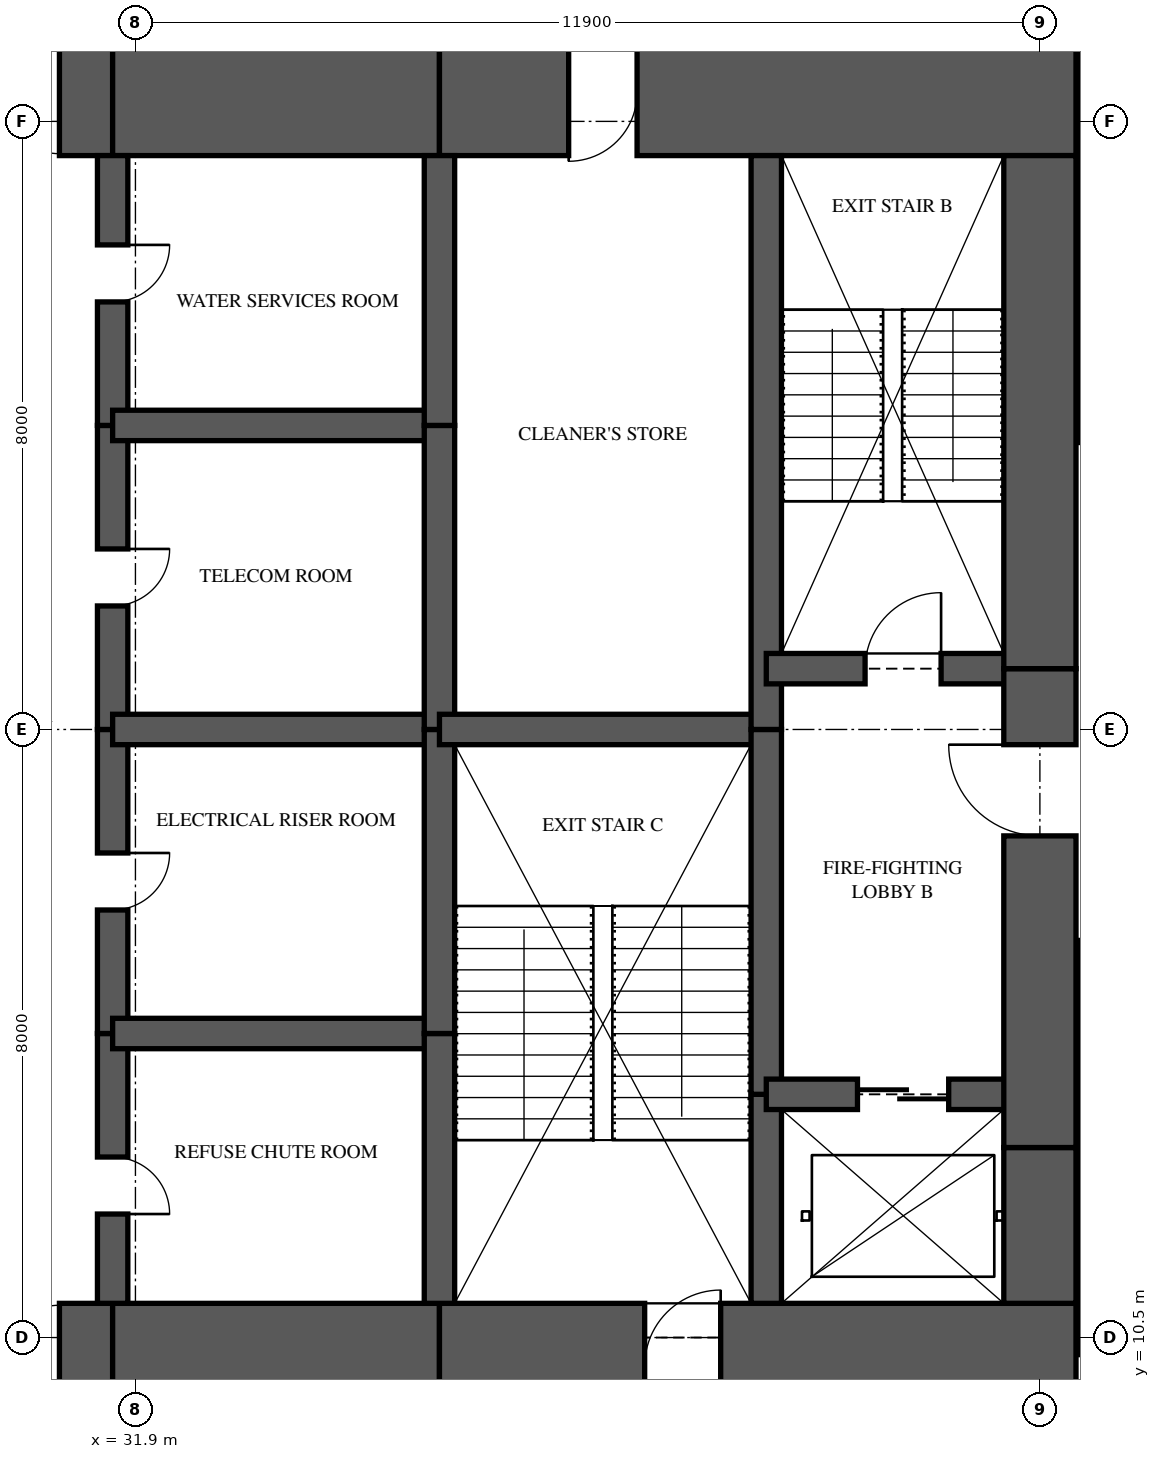
"""IFC4 building model, lengths in metres.
Left out: names, types, materials, properties, quantities, classifications, styles, units other than length and angle.
Written with IfcOpenShell. Run it as: python <this file> out.ifc"""

import sys

from ifc_helpers import new_model, si_unit, direction, frame, frame_2d, origin, place, context, subcontext, project, spatial, rectangle, extrude, element, fill, save


model = new_model("IFC4")
c1 = context("Model", 3, precision=1e-05, world=origin(), true_north=direction((0.0, 1.0)))
c2 = subcontext(c1, "Body", "Model", "MODEL_VIEW")
j1 = project(units=[si_unit("LENGTHUNIT", "METRE"), si_unit("PLANEANGLEUNIT", "RADIAN")], contexts=[c1])
p1 = place(None, origin())
s1 = spatial("IfcSite", under=j1, at=p1, CompositionType="ELEMENT")
p2 = place(p1, origin())
s2 = spatial("IfcBuilding", under=s1, at=p2, CompositionType="ELEMENT")
p3 = place(p2, frame((0.0, 0.0, 44.45)))
s3 = spatial("IfcBuildingStorey", under=s2, at=p3, CompositionType="ELEMENT", Elevation=44.45)
p4 = place(p3, frame((26.0, 10.125, 0.0), z_axis=(0.0, 0.0, 1.0), x_axis=(1.0, 0.0, 0.0)))
e1 = element("IfcWall", 1, at=p4, inside=s3, PredefinedType="SHEAR", context=c2, shape_type="SweptSolid", body=[
    extrude(rectangle(XDim=5.6, YDim=1.65, at=frame_2d((2.8, 0.0))), origin(), (0.0, 0.0, 1.0), 3.35),
])
p5 = place(p4, frame((3.3, 0.0, 0.0)))
e2 = element("IfcOpeningElement", 2, at=p5, cuts=e1, PredefinedType="OPENING", context=c2, shape_type="SweptSolid", body=[
    extrude(rectangle(XDim=1.6, YDim=2.1, at=frame_2d((0.8, 1.05))), frame((0.0, 0.835, 0.0), z_axis=(0.0, -1.0, 0.0), x_axis=(1.0, 0.0, 0.0)), (0.0, 0.0, 1.0), 1.67),
])
p6 = place(p3, frame((31.6, 10.125, 0.0), z_axis=(0.0, 0.0, 1.0), x_axis=(1.0, 0.0, 0.0)))
e3 = element("IfcWall", 3, at=p6, inside=s3, PredefinedType="SHEAR", context=c2, shape_type="SweptSolid", body=[
    extrude(rectangle(XDim=4.3, YDim=1.65, at=frame_2d((2.15, 0.0))), origin(), (0.0, 0.0, 1.0), 3.35),
])
p7 = place(p3, frame((35.9, 10.125, 0.0), z_axis=(0.0, 0.0, 1.0), x_axis=(1.0, 0.0, 0.0)))
e4 = element("IfcWall", 4, at=p7, inside=s3, PredefinedType="SHEAR", context=c2, shape_type="SweptSolid", body=[
    extrude(rectangle(XDim=8.375, YDim=1.65, at=frame_2d((4.188, 0.0))), origin(), (0.0, 0.0, 1.0), 3.35),
])
p8 = place(p7, frame((2.7, 0.0, 0.0)))
e5 = element("IfcOpeningElement", 5, at=p8, cuts=e4, PredefinedType="OPENING", context=c2, shape_type="SweptSolid", body=[
    extrude(rectangle(XDim=1.0, YDim=2.1, at=frame_2d((0.5, 1.05))), frame((0.0, 0.835, 0.0), z_axis=(0.0, -1.0, 0.0), x_axis=(1.0, 0.0, 0.0)), (0.0, 0.0, 1.0), 1.67),
])
p9 = place(p3, frame((44.275, 26.875, 0.0), z_axis=(0.0, 0.0, 1.0), x_axis=(-1.0, 0.0, 0.0)))
e6 = element("IfcWall", 6, at=p9, inside=s3, PredefinedType="SHEAR", context=c2, shape_type="SweptSolid", body=[
    extrude(rectangle(XDim=8.375, YDim=1.65, at=frame_2d((4.188, 0.0))), origin(), (0.0, 0.0, 1.0), 3.35),
])
p10 = place(p9, frame((5.775, 0.0, 0.0)))
e7 = element("IfcOpeningElement", 7, at=p10, cuts=e6, PredefinedType="OPENING", context=c2, shape_type="SweptSolid", body=[
    extrude(rectangle(XDim=0.9, YDim=2.1, at=frame_2d((0.45, 1.05))), frame((0.0, 0.835, 0.0), z_axis=(0.0, -1.0, 0.0), x_axis=(1.0, 0.0, 0.0)), (0.0, 0.0, 1.0), 1.67),
])
p11 = place(p3, frame((35.9, 26.875, 0.0), z_axis=(0.0, 0.0, 1.0), x_axis=(-1.0, 0.0, 0.0)))
e8 = element("IfcWall", 8, at=p11, inside=s3, PredefinedType="SHEAR", context=c2, shape_type="SweptSolid", body=[
    extrude(rectangle(XDim=4.3, YDim=1.65, at=frame_2d((2.15, 0.0))), origin(), (0.0, 0.0, 1.0), 3.35),
])
p12 = place(p3, frame((31.6, 26.875, 0.0), z_axis=(0.0, 0.0, 1.0), x_axis=(-1.0, 0.0, 0.0)))
e9 = element("IfcWall", 9, at=p12, inside=s3, PredefinedType="SHEAR", context=c2, shape_type="SweptSolid", body=[
    extrude(rectangle(XDim=5.6, YDim=1.65, at=frame_2d((2.8, 0.0))), origin(), (0.0, 0.0, 1.0), 3.35),
])
p13 = place(p12, frame((0.7, 0.0, 0.0)))
e10 = element("IfcOpeningElement", 10, at=p13, cuts=e9, PredefinedType="OPENING", context=c2, shape_type="SweptSolid", body=[
    extrude(rectangle(XDim=1.6, YDim=2.1, at=frame_2d((0.8, 1.05))), frame((0.0, 0.835, 0.0), z_axis=(0.0, -1.0, 0.0), x_axis=(1.0, 0.0, 0.0)), (0.0, 0.0, 1.0), 1.67),
])
p14 = place(p3, frame((43.8, 10.95, 0.0), z_axis=(0.0, 0.0, 1.0), x_axis=(0.0, 1.0, 0.0)))
e11 = element("IfcWall", 11, at=p14, inside=s3, PredefinedType="SHEAR", context=c2, shape_type="SweptSolid", body=[
    extrude(rectangle(XDim=2.05, YDim=0.95, at=frame_2d((1.025, 0.0))), origin(), (0.0, 0.0, 1.0), 3.35),
])
p15 = place(p3, frame((43.8, 13.0, 0.0), z_axis=(0.0, 0.0, 1.0), x_axis=(0.0, 1.0, 0.0)))
e12 = element("IfcWall", 12, at=p15, inside=s3, PredefinedType="SHEAR", context=c2, shape_type="SweptSolid", body=[
    extrude(rectangle(XDim=6.3, YDim=0.95, at=frame_2d((3.15, 0.0))), origin(), (0.0, 0.0, 1.0), 3.35),
])
p16 = place(p15, frame((4.1, 0.0, 0.0)))
e13 = element("IfcOpeningElement", 13, at=p16, cuts=e12, PredefinedType="OPENING", context=c2, shape_type="SweptSolid", body=[
    extrude(rectangle(XDim=1.2, YDim=2.2, at=frame_2d((0.6, 1.1))), frame((0.0, 0.485, 0.0), z_axis=(0.0, -1.0, 0.0), x_axis=(1.0, 0.0, 0.0)), (0.0, 0.0, 1.0), 0.97),
])
p17 = place(p3, frame((43.8, 19.3, 0.0), z_axis=(0.0, 0.0, 1.0), x_axis=(0.0, 1.0, 0.0)))
e14 = element("IfcWall", 14, at=p17, inside=s3, PredefinedType="SHEAR", context=c2, shape_type="SweptSolid", body=[
    extrude(rectangle(XDim=6.75, YDim=0.95, at=frame_2d((3.375, 0.0))), origin(), (0.0, 0.0, 1.0), 3.35),
])
p18 = place(p3, frame((31.6, 10.95, 0.0), z_axis=(0.0, 0.0, 1.0), x_axis=(0.0, 1.0, 0.0)))
e15 = element("IfcWall", 15, at=p18, inside=s3, PredefinedType="SHEAR", context=c2, shape_type="SweptSolid", body=[
    extrude(rectangle(XDim=3.55, YDim=0.4, at=frame_2d((1.775, 0.0))), origin(), (0.0, 0.0, 1.0), 3.35),
])
p19 = place(p18, frame((1.175, 0.0, 0.0)))
e16 = element("IfcOpeningElement", 16, at=p19, cuts=e15, PredefinedType="OPENING", context=c2, shape_type="SweptSolid", body=[
    extrude(rectangle(XDim=0.75, YDim=2.1, at=frame_2d((0.375, 1.05))), frame((0.0, 0.21, 0.0), z_axis=(0.0, -1.0, 0.0), x_axis=(1.0, 0.0, 0.0)), (0.0, 0.0, 1.0), 0.42),
])
p20 = place(p3, frame((31.6, 14.5, 0.0), z_axis=(0.0, 0.0, 1.0), x_axis=(0.0, 1.0, 0.0)))
e17 = element("IfcWall", 17, at=p20, inside=s3, PredefinedType="SHEAR", context=c2, shape_type="SweptSolid", body=[
    extrude(rectangle(XDim=4.0, YDim=0.4, at=frame_2d((2.0, 0.0))), origin(), (0.0, 0.0, 1.0), 3.35),
])
p21 = place(p20, frame((1.625, 0.0, 0.0)))
e18 = element("IfcOpeningElement", 18, at=p21, cuts=e17, PredefinedType="OPENING", context=c2, shape_type="SweptSolid", body=[
    extrude(rectangle(XDim=0.75, YDim=2.1, at=frame_2d((0.375, 1.05))), frame((0.0, 0.21, 0.0), z_axis=(0.0, -1.0, 0.0), x_axis=(1.0, 0.0, 0.0)), (0.0, 0.0, 1.0), 0.42),
])
p22 = place(p3, frame((31.6, 18.5, 0.0), z_axis=(0.0, 0.0, 1.0), x_axis=(0.0, 1.0, 0.0)))
e19 = element("IfcWall", 19, at=p22, inside=s3, PredefinedType="SHEAR", context=c2, shape_type="SweptSolid", body=[
    extrude(rectangle(XDim=4.0, YDim=0.4, at=frame_2d((2.0, 0.0))), origin(), (0.0, 0.0, 1.0), 3.35),
])
p23 = place(p22, frame((1.625, 0.0, 0.0)))
e20 = element("IfcOpeningElement", 20, at=p23, cuts=e19, PredefinedType="OPENING", context=c2, shape_type="SweptSolid", body=[
    extrude(rectangle(XDim=0.75, YDim=2.1, at=frame_2d((0.375, 1.05))), frame((0.0, 0.21, 0.0), z_axis=(0.0, -1.0, 0.0), x_axis=(1.0, 0.0, 0.0)), (0.0, 0.0, 1.0), 0.42),
])
p24 = place(p3, frame((31.6, 22.5, 0.0), z_axis=(0.0, 0.0, 1.0), x_axis=(0.0, 1.0, 0.0)))
e21 = element("IfcWall", 21, at=p24, inside=s3, PredefinedType="SHEAR", context=c2, shape_type="SweptSolid", body=[
    extrude(rectangle(XDim=3.55, YDim=0.4, at=frame_2d((1.775, 0.0))), origin(), (0.0, 0.0, 1.0), 3.35),
])
p25 = place(p24, frame((1.625, 0.0, 0.0)))
e22 = element("IfcOpeningElement", 22, at=p25, cuts=e21, PredefinedType="OPENING", context=c2, shape_type="SweptSolid", body=[
    extrude(rectangle(XDim=0.75, YDim=2.1, at=frame_2d((0.375, 1.05))), frame((0.0, 0.21, 0.0), z_axis=(0.0, -1.0, 0.0), x_axis=(1.0, 0.0, 0.0)), (0.0, 0.0, 1.0), 0.42),
])
p26 = place(p3, frame((35.9, 10.95, 0.0), z_axis=(0.0, 0.0, 1.0), x_axis=(0.0, 1.0, 0.0)))
e23 = element("IfcWall", 23, at=p26, inside=s3, PredefinedType="SHEAR", context=c2, shape_type="SweptSolid", body=[
    extrude(rectangle(XDim=3.55, YDim=0.4, at=frame_2d((1.775, 0.0))), origin(), (0.0, 0.0, 1.0), 3.35),
])
for number, where, z_axis, x_axis in (
    (24, (35.9, 14.5, 0.0), (0.0, 0.0, 1.0), (0.0, 1.0, 0.0)),
    (25, (35.9, 18.5, 0.0), (0.0, 0.0, 1.0), (0.0, 1.0, 0.0)),
):
    element("IfcWall", number, at=place(p3, frame(where, z_axis=z_axis, x_axis=x_axis)), inside=s3, PredefinedType="SHEAR", context=c2, shape_type="SweptSolid", body=[
        extrude(rectangle(XDim=4.0, YDim=0.4, at=frame_2d((2.0, 0.0))), origin(), (0.0, 0.0, 1.0), 3.35),
    ])
p27 = place(p3, frame((35.9, 22.5, 0.0), z_axis=(0.0, 0.0, 1.0), x_axis=(0.0, 1.0, 0.0)))
e26 = element("IfcWall", 26, at=p27, inside=s3, PredefinedType="SHEAR", context=c2, shape_type="SweptSolid", body=[
    extrude(rectangle(XDim=3.55, YDim=0.4, at=frame_2d((1.775, 0.0))), origin(), (0.0, 0.0, 1.0), 3.35),
])
p28 = place(p3, frame((40.2, 10.95, 0.0), z_axis=(0.0, 0.0, 1.0), x_axis=(0.0, 1.0, 0.0)))
e27 = element("IfcWall", 27, at=p28, inside=s3, PredefinedType="SHEAR", context=c2, shape_type="SweptSolid", body=[
    extrude(rectangle(XDim=2.75, YDim=0.4, at=frame_2d((1.375, 0.0))), origin(), (0.0, 0.0, 1.0), 3.35),
])
p29 = place(p3, frame((40.2, 13.7, 0.0), z_axis=(0.0, 0.0, 1.0), x_axis=(0.0, 1.0, 0.0)))
e28 = element("IfcWall", 28, at=p29, inside=s3, PredefinedType="SHEAR", context=c2, shape_type="SweptSolid", body=[
    extrude(rectangle(XDim=4.8, YDim=0.4, at=frame_2d((2.4, 0.0))), origin(), (0.0, 0.0, 1.0), 3.35),
])
p30 = place(p3, frame((40.2, 18.5, 0.0), z_axis=(0.0, 0.0, 1.0), x_axis=(0.0, 1.0, 0.0)))
e29 = element("IfcWall", 29, at=p30, inside=s3, PredefinedType="SHEAR", context=c2, shape_type="SweptSolid", body=[
    extrude(rectangle(XDim=7.55, YDim=0.4, at=frame_2d((3.775, 0.0))), origin(), (0.0, 0.0, 1.0), 3.35),
])
for number, where, z_axis, x_axis in (
    (30, (31.6, 14.5, 0.0), (0.0, 0.0, 1.0), (1.0, 0.0, 0.0)),
    (31, (31.6, 18.5, 0.0), (0.0, 0.0, 1.0), (1.0, 0.0, 0.0)),
    (32, (31.6, 22.5, 0.0), (0.0, 0.0, 1.0), (1.0, 0.0, 0.0)),
):
    element("IfcWall", number, at=place(p3, frame(where, z_axis=z_axis, x_axis=x_axis)), inside=s3, PredefinedType="SHEAR", context=c2, shape_type="SweptSolid", body=[
        extrude(rectangle(XDim=4.3, YDim=0.4, at=frame_2d((2.15, 0.0))), origin(), (0.0, 0.0, 1.0), 3.35),
    ])
p31 = place(p3, frame((35.9, 18.5, 0.0), z_axis=(0.0, 0.0, 1.0), x_axis=(1.0, 0.0, 0.0)))
e33 = element("IfcWall", 33, at=p31, inside=s3, PredefinedType="SHEAR", context=c2, shape_type="SweptSolid", body=[
    extrude(rectangle(XDim=4.3, YDim=0.4, at=frame_2d((2.15, 0.0))), origin(), (0.0, 0.0, 1.0), 3.35),
])
p32 = place(p3, frame((40.2, 13.7, 0.0), z_axis=(0.0, 0.0, 1.0), x_axis=(1.0, 0.0, 0.0)))
e34 = element("IfcWall", 34, at=p32, inside=s3, PredefinedType="SHEAR", context=c2, shape_type="SweptSolid", body=[
    extrude(rectangle(XDim=3.6, YDim=0.4, at=frame_2d((1.8, 0.0))), origin(), (0.0, 0.0, 1.0), 3.35),
])
p33 = place(p32, frame((1.2, 0.0, 0.0)))
e35 = element("IfcOpeningElement", 35, at=p33, cuts=e34, PredefinedType="OPENING", context=c2, shape_type="SweptSolid", body=[
    extrude(rectangle(XDim=1.2, YDim=2.1, at=frame_2d((0.6, 1.05))), frame((0.0, 0.21, 0.0), z_axis=(0.0, -1.0, 0.0), x_axis=(1.0, 0.0, 0.0)), (0.0, 0.0, 1.0), 0.42),
])
p34 = place(p3, frame((40.2, 19.3, 0.0), z_axis=(0.0, 0.0, 1.0), x_axis=(1.0, 0.0, 0.0)))
e36 = element("IfcWall", 36, at=p34, inside=s3, PredefinedType="SHEAR", context=c2, shape_type="SweptSolid", body=[
    extrude(rectangle(XDim=3.6, YDim=0.4, at=frame_2d((1.8, 0.0))), origin(), (0.0, 0.0, 1.0), 3.35),
])
p35 = place(p34, frame((1.3, 0.0, 0.0)))
e37 = element("IfcOpeningElement", 37, at=p35, cuts=e36, PredefinedType="OPENING", context=c2, shape_type="SweptSolid", body=[
    extrude(rectangle(XDim=1.0, YDim=2.1, at=frame_2d((0.5, 1.05))), frame((0.0, 0.21, 0.0), z_axis=(0.0, -1.0, 0.0), x_axis=(1.0, 0.0, 0.0)), (0.0, 0.0, 1.0), 0.42),
])
p36 = place(p35, origin())
e38 = element("IfcDoor", 38, at=p36, inside=s3, OperationType="SINGLE_SWING_RIGHT", PredefinedType="DOOR", context=c2, shape_type="SweptSolid", body=[
    extrude(rectangle(XDim=1.0, YDim=2.1, at=frame_2d((0.5, 1.05))), frame((0.0, 0.025, 0.0), z_axis=(0.0, -1.0, 0.0), x_axis=(1.0, 0.0, 0.0)), (0.0, 0.0, 1.0), 0.05),
])
fill(e37, e38)
p37 = place(p16, origin())
e39 = element("IfcDoor", 39, at=p37, inside=s3, OperationType="SINGLE_SWING_RIGHT", PredefinedType="DOOR", context=c2, shape_type="SweptSolid", body=[
    extrude(rectangle(XDim=1.2, YDim=2.2, at=frame_2d((0.6, 1.1))), frame((0.0, 0.025, 0.0), z_axis=(0.0, -1.0, 0.0), x_axis=(1.0, 0.0, 0.0)), (0.0, 0.0, 1.0), 0.05),
])
fill(e13, e39)
p38 = place(p33, origin())
e40 = element("IfcDoor", 40, at=p38, inside=s3, OperationType="SLIDING_TO_LEFT", PredefinedType="DOOR", context=c2, shape_type="SweptSolid", body=[
    extrude(rectangle(XDim=1.2, YDim=2.1, at=frame_2d((0.6, 1.05))), frame((0.0, 0.025, 0.0), z_axis=(0.0, -1.0, 0.0), x_axis=(1.0, 0.0, 0.0)), (0.0, 0.0, 1.0), 0.05),
])
fill(e35, e40)
p39 = place(p5, origin())
e41 = element("IfcDoor", 41, at=p39, inside=s3, OperationType="DOUBLE_DOOR_SINGLE_SWING", PredefinedType="DOOR", context=c2, shape_type="SweptSolid", body=[
    extrude(rectangle(XDim=1.6, YDim=2.1, at=frame_2d((0.8, 1.05))), frame((0.0, 0.025, 0.0), z_axis=(0.0, -1.0, 0.0), x_axis=(1.0, 0.0, 0.0)), (0.0, 0.0, 1.0), 0.05),
])
fill(e2, e41)
p40 = place(p13, origin())
e42 = element("IfcDoor", 42, at=p40, inside=s3, OperationType="DOUBLE_DOOR_SINGLE_SWING", PredefinedType="DOOR", context=c2, shape_type="SweptSolid", body=[
    extrude(rectangle(XDim=1.6, YDim=2.1, at=frame_2d((0.8, 1.05))), frame((0.0, 0.025, 0.0), z_axis=(0.0, -1.0, 0.0), x_axis=(1.0, 0.0, 0.0)), (0.0, 0.0, 1.0), 0.05),
])
fill(e10, e42)
p41 = place(p19, frame((0.75, 0.0, 0.0), z_axis=(0.0, 0.0, 1.0), x_axis=(-1.0, 0.0, 0.0)))
e43 = element("IfcDoor", 43, at=p41, inside=s3, OperationType="SINGLE_SWING_RIGHT", PredefinedType="DOOR", context=c2, shape_type="SweptSolid", body=[
    extrude(rectangle(XDim=0.75, YDim=2.1, at=frame_2d((0.375, 1.05))), frame((0.0, 0.025, 0.0), z_axis=(0.0, -1.0, 0.0), x_axis=(1.0, 0.0, 0.0)), (0.0, 0.0, 1.0), 0.05),
])
fill(e16, e43)
p42 = place(p21, frame((0.75, 0.0, 0.0), z_axis=(0.0, 0.0, 1.0), x_axis=(-1.0, 0.0, 0.0)))
e44 = element("IfcDoor", 44, at=p42, inside=s3, OperationType="SINGLE_SWING_LEFT", PredefinedType="DOOR", context=c2, shape_type="SweptSolid", body=[
    extrude(rectangle(XDim=0.75, YDim=2.1, at=frame_2d((0.375, 1.05))), frame((0.0, 0.025, 0.0), z_axis=(0.0, -1.0, 0.0), x_axis=(1.0, 0.0, 0.0)), (0.0, 0.0, 1.0), 0.05),
])
fill(e18, e44)
p43 = place(p23, frame((0.75, 0.0, 0.0), z_axis=(0.0, 0.0, 1.0), x_axis=(-1.0, 0.0, 0.0)))
e45 = element("IfcDoor", 45, at=p43, inside=s3, OperationType="SINGLE_SWING_LEFT", PredefinedType="DOOR", context=c2, shape_type="SweptSolid", body=[
    extrude(rectangle(XDim=0.75, YDim=2.1, at=frame_2d((0.375, 1.05))), frame((0.0, 0.025, 0.0), z_axis=(0.0, -1.0, 0.0), x_axis=(1.0, 0.0, 0.0)), (0.0, 0.0, 1.0), 0.05),
])
fill(e20, e45)
p44 = place(p25, frame((0.75, 0.0, 0.0), z_axis=(0.0, 0.0, 1.0), x_axis=(-1.0, 0.0, 0.0)))
e46 = element("IfcDoor", 46, at=p44, inside=s3, OperationType="SINGLE_SWING_LEFT", PredefinedType="DOOR", context=c2, shape_type="SweptSolid", body=[
    extrude(rectangle(XDim=0.75, YDim=2.1, at=frame_2d((0.375, 1.05))), frame((0.0, 0.025, 0.0), z_axis=(0.0, -1.0, 0.0), x_axis=(1.0, 0.0, 0.0)), (0.0, 0.0, 1.0), 0.05),
])
fill(e22, e46)
p45 = place(p8, origin())
e47 = element("IfcDoor", 47, at=p45, inside=s3, OperationType="SINGLE_SWING_RIGHT", PredefinedType="DOOR", context=c2, shape_type="SweptSolid", body=[
    extrude(rectangle(XDim=1.0, YDim=2.1, at=frame_2d((0.5, 1.05))), frame((0.0, 0.025, 0.0), z_axis=(0.0, -1.0, 0.0), x_axis=(1.0, 0.0, 0.0)), (0.0, 0.0, 1.0), 0.05),
])
fill(e5, e47)
p46 = place(p10, origin())
e48 = element("IfcDoor", 48, at=p46, inside=s3, OperationType="SINGLE_SWING_RIGHT", PredefinedType="DOOR", context=c2, shape_type="SweptSolid", body=[
    extrude(rectangle(XDim=0.9, YDim=2.1, at=frame_2d((0.45, 1.05))), frame((0.0, 0.47, 0.0), z_axis=(0.0, -1.0, 0.0), x_axis=(1.0, 0.0, 0.0)), (0.0, 0.0, 1.0), 0.8),
])
fill(e7, e48)
save(model, sys.argv[1])
